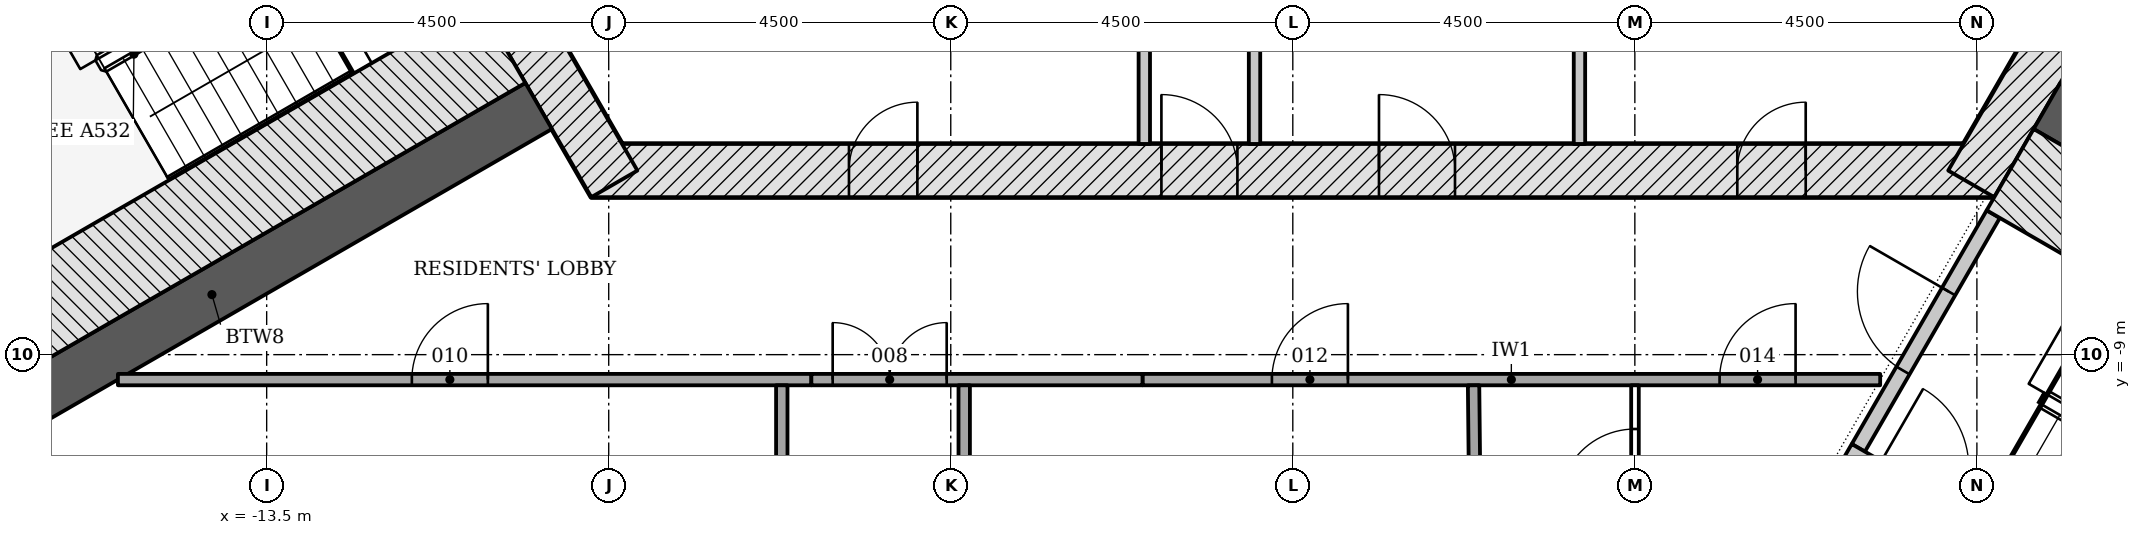
"""IFC4 building model, lengths in metres.
Left out: names, types, materials, properties, quantities, classifications, styles, units other than length and angle.
Written with IfcOpenShell. Run it as: python <this file> out.ifc"""

import sys

from ifc_helpers import new_model, si_unit, direction, frame, frame_2d, origin, place, context, subcontext, project, spatial, polyline, rectangle, outline, extrude, element, fill, save


model = new_model("IFC4")
c1 = context("Model", 3, precision=1e-05, world=origin(), true_north=direction((0.0, 1.0)))
c2 = subcontext(c1, "Body", "Model", "MODEL_VIEW")
j1 = project(units=[si_unit("LENGTHUNIT", "METRE"), si_unit("PLANEANGLEUNIT", "RADIAN")], contexts=[c1])
p1 = place(None, origin())
s1 = spatial("IfcSite", under=j1, at=p1, CompositionType="ELEMENT")
p2 = place(p1, origin())
s2 = spatial("IfcBuilding", under=s1, at=p2, CompositionType="ELEMENT")
p3 = place(p2, frame((0.0, 0.0, 174.3)))
s3 = spatial("IfcBuildingStorey", under=s2, at=p3, CompositionType="ELEMENT", Elevation=174.3)
p4 = place(p3, frame((-9.229, -6.578, -0.2), z_axis=(0.0, 0.0, 1.0), x_axis=(1.0, 0.0, 0.0)))
e1 = element("IfcWall", 1, at=p4, inside=s3, PredefinedType="SHEAR", context=c2, shape_type="SweptSolid", body=[
    extrude(rectangle(XDim=18.458, YDim=0.7, at=frame_2d((9.229, 0.0))), origin(), (0.0, 0.0, 1.0), 3.6),
])
p5 = place(p4, frame((7.5, 0.0, 0.2)))
e2 = element("IfcOpeningElement", 2, at=p5, cuts=e1, PredefinedType="OPENING", context=c2, shape_type="SweptSolid", body=[
    extrude(rectangle(XDim=1.0, YDim=2.1, at=frame_2d((0.5, 1.05))), frame((0.0, 0.36, 0.0), z_axis=(0.0, -1.0, 0.0), x_axis=(1.0, 0.0, 0.0)), (0.0, 0.0, 1.0), 0.72),
])
p6 = place(p4, frame((3.389, 0.0, 0.2)))
e3 = element("IfcOpeningElement", 3, at=p6, cuts=e1, PredefinedType="OPENING", context=c2, shape_type="SweptSolid", body=[
    extrude(rectangle(XDim=0.9, YDim=2.1, at=frame_2d((0.45, 1.05))), frame((0.0, 0.36, 0.0), z_axis=(0.0, -1.0, 0.0), x_axis=(1.0, 0.0, 0.0)), (0.0, 0.0, 1.0), 0.72),
])
p7 = place(p4, frame((10.363, 0.0, 0.2)))
e4 = element("IfcOpeningElement", 4, at=p7, cuts=e1, PredefinedType="OPENING", context=c2, shape_type="SweptSolid", body=[
    extrude(rectangle(XDim=1.0, YDim=2.1, at=frame_2d((0.5, 1.05))), frame((0.0, 0.36, 0.0), z_axis=(0.0, -1.0, 0.0), x_axis=(1.0, 0.0, 0.0)), (0.0, 0.0, 1.0), 0.72),
])
p8 = place(p4, frame((15.077, 0.0, 0.2)))
e5 = element("IfcOpeningElement", 5, at=p8, cuts=e1, PredefinedType="OPENING", context=c2, shape_type="SweptSolid", body=[
    extrude(rectangle(XDim=0.9, YDim=2.1, at=frame_2d((0.45, 1.05))), frame((0.0, 0.36, 0.0), z_axis=(0.0, -1.0, 0.0), x_axis=(1.0, 0.0, 0.0)), (0.0, 0.0, 1.0), 0.72),
])
for number, where, z_axis, x_axis in (
    (6, (8.926, -6.753, -0.2), (0.0, 0.0, 1.0), (0.5, 0.866, 0.0)),
    (7, (-10.311, -4.353, -0.2), (0.0, 0.0, 1.0), (0.5, -0.866, 0.0)),
):
    element("IfcWall", number, at=place(p3, frame(where, z_axis=z_axis, x_axis=x_axis)), inside=s3, PredefinedType="SHEAR", context=c2, shape_type="SweptSolid", body=[
        extrude(rectangle(XDim=2.771, YDim=0.7, at=frame_2d((1.386, 0.0))), origin(), (0.0, 0.0, 1.0), 3.6),
    ])
for number, where, z_axis, x_axis in (
    (8, (-9.922, -5.728, -0.2), (0.0, 0.0, 1.0), (-0.866, -0.5, 0.0)),
    (9, (9.922, -5.728, -0.2), (0.0, 0.0, 1.0), (0.866, -0.5, 0.0)),
):
    element("IfcWall", number, at=place(p3, frame(where, z_axis=z_axis, x_axis=x_axis)), inside=s3, PredefinedType="SHEAR", context=c2, shape_type="SweptSolid", body=[
        extrude(rectangle(XDim=9.927, YDim=0.7, at=frame_2d((4.964, 0.0))), origin(), (0.0, 0.0, 1.0), 3.6),
    ])
p9 = place(p3, origin())
e10 = element("IfcWall", 10, at=p9, inside=s3, PredefinedType="NOTDEFINED", context=c2, shape_type="SweptSolid", body=[
    extrude(outline(polyline([(-21.388, -5.822), (-22.265, -7.662), (-22.712, -9.097), (-22.753, -10.599), (-22.383, -12.055), (-21.632, -13.357), (-20.555, -14.405), (-19.234, -15.121), (-17.768, -15.451), (-15.736, -15.612), (-15.712, -15.312), (-17.723, -15.154), (-19.128, -14.837), (-20.376, -14.161), (-21.393, -13.171), (-22.103, -11.941), (-22.452, -10.565), (-22.413, -9.146), (-21.985, -7.772), (-21.117, -5.951), (-21.388, -5.822)])), origin(), (0.0, 0.0, 1.0), 3.3),
])
p10 = place(p3, frame((-1.954, 8.942, 0.0), z_axis=(0.0, 0.0, 1.0), x_axis=(0.0, -1.0, 0.0)))
e11 = element("IfcWall", 11, at=p10, inside=s3, PredefinedType="PARTITIONING", context=c2, shape_type="SweptSolid", body=[
    extrude(rectangle(XDim=15.171, YDim=0.15, at=frame_2d((7.585, 0.0))), origin(), (0.0, 0.0, 1.0), 3.4),
])
p11 = place(p10, frame((7.121, 0.0, 0.0)))
e12 = element("IfcOpeningElement", 12, at=p11, cuts=e11, PredefinedType="OPENING", context=c2, shape_type="SweptSolid", body=[
    extrude(rectangle(XDim=0.9, YDim=2.1, at=frame_2d((0.45, 1.05))), frame((0.0, 0.085, 0.0), z_axis=(0.0, -1.0, 0.0), x_axis=(1.0, 0.0, 0.0)), (0.0, 0.0, 1.0), 0.17),
])
p12 = place(p3, frame((-0.504, 5.897, 0.0), z_axis=(0.0, 0.0, 1.0), x_axis=(0.0, -1.0, 0.0)))
e13 = element("IfcWall", 13, at=p12, inside=s3, PredefinedType="PARTITIONING", context=c2, shape_type="SweptSolid", body=[
    extrude(rectangle(XDim=12.125, YDim=0.15, at=frame_2d((6.062, 0.0))), origin(), (0.0, 0.0, 1.0), 3.4),
])
p13 = place(p12, frame((4.114, 0.0, 0.0)))
e14 = element("IfcOpeningElement", 14, at=p13, cuts=e13, PredefinedType="OPENING", context=c2, shape_type="SweptSolid", body=[
    extrude(rectangle(XDim=0.9, YDim=2.1, at=frame_2d((0.45, 1.05))), frame((0.0, 0.085, 0.0), z_axis=(0.0, -1.0, 0.0), x_axis=(1.0, 0.0, 0.0)), (0.0, 0.0, 1.0), 0.17),
])
p14 = place(p3, frame((3.771, -3.303, 0.0), z_axis=(0.0, 0.0, 1.0), x_axis=(0.0, -1.0, 0.0)))
e15 = element("IfcWall", 15, at=p14, inside=s3, PredefinedType="PARTITIONING", context=c2, shape_type="SweptSolid", body=[
    extrude(rectangle(XDim=2.925, YDim=0.15, at=frame_2d((1.462, 0.0))), origin(), (0.0, 0.0, 1.0), 3.4),
])
p15 = place(p3, frame((-10.406, -4.89, -0.2), z_axis=(0.0, 0.0, 1.0), x_axis=(-0.866018442252, -0.500012057535, 0.0)))
e16 = element("IfcWall", 16, at=p15, inside=s3, PredefinedType="SHEAR", context=c2, shape_type="SweptSolid", body=[
    extrude(rectangle(XDim=7.2, YDim=1.236, at=frame_2d((3.6, 0.0))), origin(), (0.0, 0.0, 1.0), 3.6),
])
p16 = place(p3, frame((7.44, -10.226, -0.2), z_axis=(0.0, 0.0, 1.0), x_axis=(0.500022077904, 0.866012656725, 0.0)))
e17 = element("IfcWall", 17, at=p16, inside=s3, PredefinedType="SHEAR", context=c2, shape_type="SweptSolid", body=[
    extrude(rectangle(XDim=3.55, YDim=0.2, at=frame_2d((1.775, 0.0))), origin(), (0.0, 0.0, 1.0), 3.6),
])
p17 = place(p16, frame((1.175, 0.0, 0.2)))
e18 = element("IfcOpeningElement", 18, at=p17, cuts=e17, PredefinedType="OPENING", context=c2, shape_type="SweptSolid", body=[
    extrude(rectangle(XDim=1.2, YDim=2.1, at=frame_2d((0.6, 1.05))), frame((0.0, 0.11, 0.0), z_axis=(0.0, -1.0, 0.0), x_axis=(1.0, 0.0, 0.0)), (0.0, 0.0, 1.0), 0.22),
])
p18 = place(p3, frame((7.304, -10.262, -0.2), z_axis=(0.0, 0.0, 1.0), x_axis=(0.866026594901, -0.49999793692, 0.0)))
e19 = element("IfcWall", 19, at=p18, inside=s3, PredefinedType="SHEAR", context=c2, shape_type="SweptSolid", body=[
    extrude(rectangle(XDim=5.6, YDim=0.2, at=frame_2d((2.8, 0.0))), origin(), (0.0, 0.0, 1.0), 3.6),
])
p19 = place(p18, frame((0.45, 0.0, 0.2)))
e20 = element("IfcOpeningElement", 20, at=p19, cuts=e19, PredefinedType="OPENING", context=c2, shape_type="SweptSolid", body=[
    extrude(rectangle(XDim=1.2, YDim=2.1, at=frame_2d((0.6, 1.05))), frame((0.0, 0.11, 0.0), z_axis=(0.0, -1.0, 0.0), x_axis=(1.0, 0.0, 0.0)), (0.0, 0.0, 1.0), 0.22),
])
p20 = place(p3, frame((9.438, -6.566, -0.2), z_axis=(0.0, 0.0, 1.0), x_axis=(0.866026919366, -0.499997374926, 0.0)))
e21 = element("IfcWall", 21, at=p20, inside=s3, PredefinedType="SHEAR", context=c2, shape_type="SweptSolid", body=[
    extrude(rectangle(XDim=7.2, YDim=1.236, at=frame_2d((3.6, 0.0))), origin(), (0.0, 0.0, 1.0), 3.6),
])
p21 = place(p3, frame((15.807, -8.722, 0.0), z_axis=(0.0, 0.0, 1.0), x_axis=(-0.500001078133, 0.866024781323, 0.0)))
e22 = element("IfcWall", 22, at=p21, inside=s3, PredefinedType="PARTITIONING", context=c2, shape_type="SweptSolid", body=[
    extrude(rectangle(XDim=23.185, YDim=0.15, at=frame_2d((11.592, 0.0))), origin(), (0.0, 0.0, 1.0), 2.847),
])
p22 = place(p21, frame((10.551, 0.0, 0.0)))
e23 = element("IfcOpeningElement", 23, at=p22, cuts=e22, PredefinedType="OPENING", context=c2, shape_type="SweptSolid", body=[
    extrude(rectangle(XDim=1.5, YDim=2.1, at=frame_2d((0.75, 1.05))), frame((0.0, 0.085, 0.0), z_axis=(0.0, -1.0, 0.0), x_axis=(1.0, 0.0, 0.0)), (0.0, 0.0, 1.0), 0.17),
])
p23 = place(p21, frame((17.335, 0.0, 0.0)))
e24 = element("IfcOpeningElement", 24, at=p23, cuts=e22, PredefinedType="OPENING", context=c2, shape_type="SweptSolid", body=[
    extrude(rectangle(XDim=1.0, YDim=2.1, at=frame_2d((0.5, 1.05))), frame((0.0, 0.085, 0.0), z_axis=(0.0, -1.0, 0.0), x_axis=(1.0, 0.0, 0.0)), (0.0, 0.0, 1.0), 0.17),
])
p24 = place(p3, frame((-15.457, -9.328, 0.0), z_axis=(0.0, 0.0, 1.0), x_axis=(1.0, 0.0, 0.0)))
e25 = element("IfcWall", 25, at=p24, inside=s3, PredefinedType="PARTITIONING", context=c2, shape_type="SweptSolid", body=[
    extrude(rectangle(XDim=9.123, YDim=0.15, at=frame_2d((4.562, 0.0))), origin(), (0.0, 0.0, 1.0), 2.847),
])
p25 = place(p24, frame((3.867, 0.0, 0.0)))
e26 = element("IfcOpeningElement", 26, at=p25, cuts=e25, PredefinedType="OPENING", context=c2, shape_type="SweptSolid", body=[
    extrude(rectangle(XDim=1.0, YDim=2.1, at=frame_2d((0.5, 1.05))), frame((0.0, 0.085, 0.0), z_axis=(0.0, -1.0, 0.0), x_axis=(1.0, 0.0, 0.0)), (0.0, 0.0, 1.0), 0.17),
])
p26 = place(p3, frame((-1.977, -9.328, 0.0), z_axis=(0.0, 0.0, 1.0), x_axis=(1.0, 0.0, 0.0)))
e27 = element("IfcWall", 27, at=p26, inside=s3, PredefinedType="PARTITIONING", context=c2, shape_type="SweptSolid", body=[
    extrude(rectangle(XDim=9.705, YDim=0.15, at=frame_2d((4.853, 0.0))), origin(), (0.0, 0.0, 1.0), 2.847),
])
p27 = place(p26, frame((1.702, 0.0, 0.0)))
e28 = element("IfcOpeningElement", 28, at=p27, cuts=e27, PredefinedType="OPENING", context=c2, shape_type="SweptSolid", body=[
    extrude(rectangle(XDim=1.0, YDim=2.1, at=frame_2d((0.5, 1.05))), frame((0.0, 0.085, 0.0), z_axis=(0.0, -1.0, 0.0), x_axis=(1.0, 0.0, 0.0)), (0.0, 0.0, 1.0), 0.17),
])
p28 = place(p26, frame((7.592, 0.0, 0.0)))
e29 = element("IfcOpeningElement", 29, at=p28, cuts=e27, PredefinedType="OPENING", context=c2, shape_type="SweptSolid", body=[
    extrude(rectangle(XDim=1.0, YDim=2.1, at=frame_2d((0.5, 1.05))), frame((0.0, 0.085, 0.0), z_axis=(0.0, -1.0, 0.0), x_axis=(1.0, 0.0, 0.0)), (0.0, 0.0, 1.0), 0.17),
])
p29 = place(p3, frame((-6.334, -9.328, 0.0), z_axis=(0.0, 0.0, 1.0), x_axis=(1.0, 0.0, 0.0)))
e30 = element("IfcWall", 30, at=p29, inside=s3, PredefinedType="PARTITIONING", context=c2, shape_type="SweptSolid", body=[
    extrude(rectangle(XDim=4.357, YDim=0.15, at=frame_2d((2.178, 0.0))), origin(), (0.0, 0.0, 1.0), 2.847),
])
p30 = place(p29, frame((0.281, 0.0, 0.0)))
e31 = element("IfcOpeningElement", 31, at=p30, cuts=e30, PredefinedType="OPENING", context=c2, shape_type="SweptSolid", body=[
    extrude(rectangle(XDim=1.5, YDim=2.1, at=frame_2d((0.75, 1.05))), frame((0.0, 0.085, 0.0), z_axis=(0.0, -1.0, 0.0), x_axis=(1.0, 0.0, 0.0)), (0.0, 0.0, 1.0), 0.17),
])
p31 = place(p3, frame((2.443, -15.479, 0.0), z_axis=(0.0, 0.0, 1.0), x_axis=(-0.010607777316, 0.999943735947, 0.0)))
e32 = element("IfcWall", 32, at=p31, inside=s3, PredefinedType="PARTITIONING", context=c2, shape_type="SweptSolid", body=[
    extrude(rectangle(XDim=6.076, YDim=0.15, at=frame_2d((3.038, 0.0))), origin(), (0.0, 0.0, 1.0), 3.4),
])
p32 = place(p3, frame((-6.723, -9.403, 0.0), z_axis=(0.0, 0.0, 1.0), x_axis=(0.0, -1.0, 0.0)))
e33 = element("IfcWall", 33, at=p32, inside=s3, PredefinedType="PARTITIONING", context=c2, shape_type="SweptSolid", body=[
    extrude(rectangle(XDim=4.005, YDim=0.15, at=frame_2d((2.002, 0.0))), origin(), (0.0, 0.0, 1.0), 2.847),
])
p33 = place(p3, frame((-4.323, -9.403, 0.0), z_axis=(0.0, 0.0, 1.0), x_axis=(0.0, -1.0, 0.0)))
e34 = element("IfcWall", 34, at=p33, inside=s3, PredefinedType="PARTITIONING", context=c2, shape_type="SweptSolid", body=[
    extrude(rectangle(XDim=4.005, YDim=0.15, at=frame_2d((2.002, 0.0))), origin(), (0.0, 0.0, 1.0), 3.4),
])
p34 = place(p3, frame((4.502, -11.578, 0.0), z_axis=(0.0, 0.0, 1.0), x_axis=(0.0, 1.0, 0.0)))
e35 = element("IfcWall", 35, at=p34, inside=s3, PredefinedType="PARTITIONING", context=c2, shape_type="SweptSolid", body=[
    extrude(rectangle(XDim=2.175, YDim=0.1, at=frame_2d((1.087, 0.0))), origin(), (0.0, 0.0, 1.0), 3.4),
])
p35 = place(p34, frame((0.6, 0.0, 0.0)))
e36 = element("IfcOpeningElement", 36, at=p35, cuts=e35, PredefinedType="OPENING", context=c2, shape_type="SweptSolid", body=[
    extrude(rectangle(XDim=1.0, YDim=2.1, at=frame_2d((0.5, 1.05))), frame((0.0, 0.06, 0.0), z_axis=(0.0, -1.0, 0.0), x_axis=(1.0, 0.0, 0.0)), (0.0, 0.0, 1.0), 0.12),
])
p36 = place(p5, origin())
e37 = element("IfcDoor", 37, at=p36, inside=s3, OperationType="SINGLE_SWING_LEFT", PredefinedType="DOOR", context=c2, shape_type="SweptSolid", body=[
    extrude(rectangle(XDim=1.0, YDim=2.1, at=frame_2d((0.5, 1.05))), frame((0.0, 0.075, 0.0), z_axis=(0.0, -1.0, 0.0), x_axis=(1.0, 0.0, 0.0)), (0.0, 0.0, 1.0), 0.15),
])
fill(e2, e37)
p37 = place(p6, origin())
e38 = element("IfcDoor", 38, at=p37, inside=s3, OperationType="SINGLE_SWING_RIGHT", PredefinedType="DOOR", context=c2, shape_type="SweptSolid", body=[
    extrude(rectangle(XDim=0.9, YDim=2.1, at=frame_2d((0.45, 1.05))), frame((0.0, 0.075, 0.0), z_axis=(0.0, -1.0, 0.0), x_axis=(1.0, 0.0, 0.0)), (0.0, 0.0, 1.0), 0.15),
])
fill(e3, e38)
p38 = place(p7, origin())
e39 = element("IfcDoor", 39, at=p38, inside=s3, OperationType="SINGLE_SWING_LEFT", PredefinedType="DOOR", context=c2, shape_type="SweptSolid", body=[
    extrude(rectangle(XDim=1.0, YDim=2.1, at=frame_2d((0.5, 1.05))), frame((0.0, 0.075, 0.0), z_axis=(0.0, -1.0, 0.0), x_axis=(1.0, 0.0, 0.0)), (0.0, 0.0, 1.0), 0.15),
])
fill(e4, e39)
p39 = place(p8, origin())
e40 = element("IfcDoor", 40, at=p39, inside=s3, OperationType="SINGLE_SWING_RIGHT", PredefinedType="DOOR", context=c2, shape_type="SweptSolid", body=[
    extrude(rectangle(XDim=0.9, YDim=2.1, at=frame_2d((0.45, 1.05))), frame((0.0, 0.075, 0.0), z_axis=(0.0, -1.0, 0.0), x_axis=(1.0, 0.0, 0.0)), (0.0, 0.0, 1.0), 0.15),
])
fill(e5, e40)
p40 = place(p17, origin())
e41 = element("IfcDoor", 41, at=p40, inside=s3, OperationType="SINGLE_SWING_RIGHT", PredefinedType="DOOR", context=c2, shape_type="SweptSolid", body=[
    extrude(rectangle(XDim=1.2, YDim=2.1, at=frame_2d((0.6, 1.05))), frame((0.0, 0.025, 0.0), z_axis=(0.0, -1.0, 0.0), x_axis=(1.0, 0.0, 0.0)), (0.0, 0.0, 1.0), 0.05),
])
fill(e18, e41)
p41 = place(p30, origin())
e42 = element("IfcDoor", 42, at=p41, inside=s3, OperationType="DOUBLE_DOOR_SINGLE_SWING", PredefinedType="DOOR", context=c2, shape_type="SweptSolid", body=[
    extrude(rectangle(XDim=1.5, YDim=2.1, at=frame_2d((0.75, 1.05))), frame((0.0, 0.025, 0.0), z_axis=(0.0, -1.0, 0.0), x_axis=(1.0, 0.0, 0.0)), (0.0, 0.0, 1.0), 0.05),
])
fill(e31, e42)
p42 = place(p25, origin())
e43 = element("IfcDoor", 43, at=p42, inside=s3, OperationType="SINGLE_SWING_RIGHT", PredefinedType="DOOR", context=c2, shape_type="SweptSolid", body=[
    extrude(rectangle(XDim=1.0, YDim=2.1, at=frame_2d((0.5, 1.05))), frame((0.0, 0.025, 0.0), z_axis=(0.0, -1.0, 0.0), x_axis=(1.0, 0.0, 0.0)), (0.0, 0.0, 1.0), 0.05),
])
fill(e26, e43)
p43 = place(p27, origin())
e44 = element("IfcDoor", 44, at=p43, inside=s3, OperationType="SINGLE_SWING_RIGHT", PredefinedType="DOOR", context=c2, shape_type="SweptSolid", body=[
    extrude(rectangle(XDim=1.0, YDim=2.1, at=frame_2d((0.5, 1.05))), frame((0.0, 0.025, 0.0), z_axis=(0.0, -1.0, 0.0), x_axis=(1.0, 0.0, 0.0)), (0.0, 0.0, 1.0), 0.05),
])
fill(e28, e44)
p44 = place(p35, origin())
e45 = element("IfcDoor", 45, at=p44, inside=s3, OperationType="SINGLE_SWING_LEFT", PredefinedType="DOOR", context=c2, shape_type="SweptSolid", body=[
    extrude(rectangle(XDim=1.0, YDim=2.1, at=frame_2d((0.5, 1.05))), frame((0.0, 0.025, 0.0), z_axis=(0.0, -1.0, 0.0), x_axis=(1.0, 0.0, 0.0)), (0.0, 0.0, 1.0), 0.05),
])
fill(e36, e45)
p45 = place(p28, origin())
e46 = element("IfcDoor", 46, at=p45, inside=s3, OperationType="SINGLE_SWING_RIGHT", PredefinedType="DOOR", context=c2, shape_type="SweptSolid", body=[
    extrude(rectangle(XDim=1.0, YDim=2.1, at=frame_2d((0.5, 1.05))), frame((0.0, 0.025, 0.0), z_axis=(0.0, -1.0, 0.0), x_axis=(1.0, 0.0, 0.0)), (0.0, 0.0, 1.0), 0.05),
])
fill(e29, e46)
save(model, sys.argv[1])
